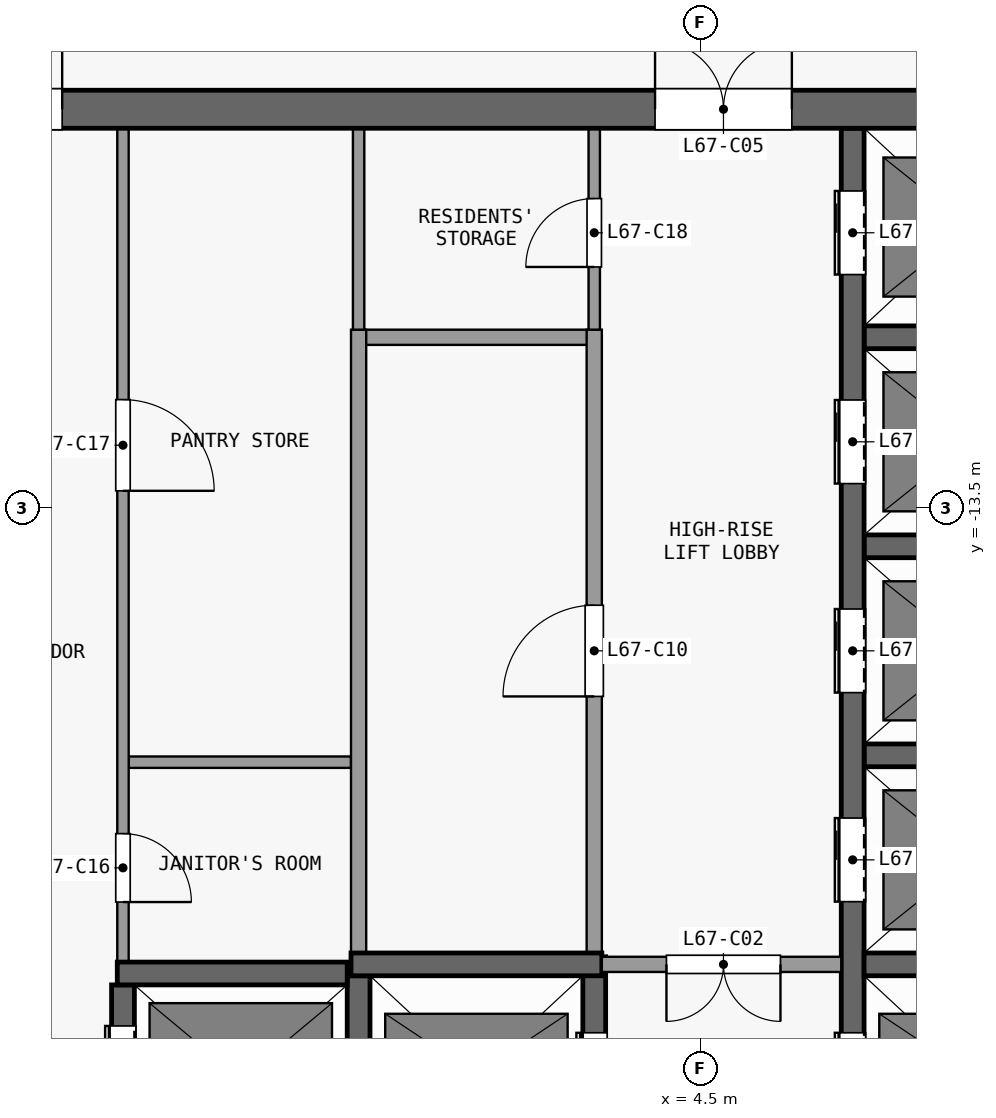
"""IFC4 building model, lengths in metres.
Left out: names, types, materials, properties, quantities, classifications, styles, units other than length and angle.
Written with IfcOpenShell. Run it as: python <this file> out.ifc"""

import sys

from ifc_helpers import new_model, si_unit, direction, frame, frame_2d, origin, place, context, subcontext, project, spatial, rectangle, extrude, element, fill, save


model = new_model("IFC4")
c1 = context("Model", 3, precision=1e-05, world=origin(), true_north=direction((0.0, 1.0)))
c2 = subcontext(c1, "Body", "Model", "MODEL_VIEW")
j1 = project(units=[si_unit("LENGTHUNIT", "METRE"), si_unit("PLANEANGLEUNIT", "RADIAN")], contexts=[c1])
p1 = place(None, origin())
s1 = spatial("IfcSite", under=j1, at=p1, CompositionType="ELEMENT")
p2 = place(p1, origin())
s2 = spatial("IfcBuilding", under=s1, at=p2, CompositionType="ELEMENT")
p3 = place(p2, frame((0.0, 0.0, 266.3)))
s3 = spatial("IfcBuildingStorey", under=s2, at=p3, CompositionType="ELEMENT", Elevation=266.3)
p4 = place(p3, frame((-13.1, -8.25, 0.0), z_axis=(0.0, 0.0, 1.0), x_axis=(1.0, 0.0, 0.0)))
e1 = element("IfcWall", 1, at=p4, inside=s3, PredefinedType="SHEAR", context=c2, shape_type="SweptSolid", body=[
    extrude(rectangle(XDim=26.2, YDim=0.5, at=frame_2d((13.1, 0.0))), origin(), (0.0, 0.0, 1.0), 3.3),
])
p5 = place(p4, frame((7.4, 0.0, 0.0)))
e2 = element("IfcOpeningElement", 2, at=p5, cuts=e1, PredefinedType="OPENING", context=c2, shape_type="SweptSolid", body=[
    extrude(rectangle(XDim=1.8, YDim=2.1, at=frame_2d((0.9, 1.05))), frame((0.0, 0.26, 0.0), z_axis=(0.0, -1.0, 0.0), x_axis=(1.0, 0.0, 0.0)), (0.0, 0.0, 1.0), 0.52),
])
p6 = place(p4, frame((17.0, 0.0, 0.0)))
e3 = element("IfcOpeningElement", 3, at=p6, cuts=e1, PredefinedType="OPENING", context=c2, shape_type="SweptSolid", body=[
    extrude(rectangle(XDim=1.8, YDim=2.1, at=frame_2d((0.9, 1.05))), frame((0.0, 0.26, 0.0), z_axis=(0.0, -1.0, 0.0), x_axis=(1.0, 0.0, 0.0)), (0.0, 0.0, 1.0), 0.52),
])
p7 = place(p4, frame((2.325, 0.0, 0.0)))
e4 = element("IfcOpeningElement", 4, at=p7, cuts=e1, PredefinedType="OPENING", context=c2, shape_type="SweptSolid", body=[
    extrude(rectangle(XDim=0.9, YDim=2.1, at=frame_2d((0.45, 1.05))), frame((0.0, 0.26, 0.0), z_axis=(0.0, -1.0, 0.0), x_axis=(1.0, 0.0, 0.0)), (0.0, 0.0, 1.0), 0.52),
])
p8 = place(p4, frame((22.975, 0.0, 0.0)))
e5 = element("IfcOpeningElement", 5, at=p8, cuts=e1, PredefinedType="OPENING", context=c2, shape_type="SweptSolid", body=[
    extrude(rectangle(XDim=0.9, YDim=2.1, at=frame_2d((0.45, 1.05))), frame((0.0, 0.26, 0.0), z_axis=(0.0, -1.0, 0.0), x_axis=(1.0, 0.0, 0.0)), (0.0, 0.0, 1.0), 0.52),
])
p9 = place(p3, frame((-3.175, -19.62, 0.0), z_axis=(0.0, 0.0, 1.0), x_axis=(1.0, 0.0, 0.0)))
e6 = element("IfcWall", 6, at=p9, inside=s3, PredefinedType="SHEAR", context=c2, shape_type="SweptSolid", body=[
    extrude(rectangle(XDim=3.025, YDim=0.3, at=frame_2d((1.513, 0.0))), origin(), (0.0, 0.0, 1.0), 3.3),
])
p10 = place(p3, frame((-0.1, -19.5, 0.0), z_axis=(0.0, 0.0, 1.0), x_axis=(1.0, 0.0, 0.0)))
e7 = element("IfcWall", 7, at=p10, inside=s3, PredefinedType="SHEAR", context=c2, shape_type="SweptSolid", body=[
    extrude(rectangle(XDim=3.3, YDim=0.3, at=frame_2d((1.65, 0.0))), origin(), (0.0, 0.0, 1.0), 3.3),
])
p11 = place(p3, frame((6.35, -19.5, 0.0), z_axis=(0.0, 0.0, 1.0), x_axis=(-1.0, 0.0, 0.0)))
e8 = element("IfcWall", 8, at=p11, inside=s3, PredefinedType="PARTITIONING", context=c2, shape_type="SweptSolid", body=[
    extrude(rectangle(XDim=3.15, YDim=0.2, at=frame_2d((1.575, 0.0))), origin(), (0.0, 0.0, 1.0), 3.3),
])
p12 = place(p11, frame((0.8, 0.0, 0.0)))
e9 = element("IfcOpeningElement", 9, at=p12, cuts=e8, PredefinedType="OPENING", context=c2, shape_type="SweptSolid", body=[
    extrude(rectangle(XDim=1.5, YDim=2.1, at=frame_2d((0.75, 1.05))), frame((0.0, 0.11, 0.0), z_axis=(0.0, -1.0, 0.0), x_axis=(1.0, 0.0, 0.0)), (0.0, 0.0, 1.0), 0.22),
])
p13 = place(p3, frame((6.65, -19.5, 0.0), z_axis=(0.0, 0.0, 1.0), x_axis=(1.0, 0.0, 0.0)))
e10 = element("IfcWall", 10, at=p13, inside=s3, PredefinedType="SHEAR", context=c2, shape_type="SweptSolid", body=[
    extrude(rectangle(XDim=2.8, YDim=0.3, at=frame_2d((1.4, 0.0))), origin(), (0.0, 0.0, 1.0), 3.3),
])
p14 = place(p3, frame((-3.025, -16.84, 0.0), z_axis=(0.0, 0.0, 1.0), x_axis=(1.0, 0.0, 0.0)))
e11 = element("IfcWall", 11, at=p14, inside=s3, PredefinedType="PARTITIONING", context=c2, shape_type="SweptSolid", body=[
    extrude(rectangle(XDim=2.925, YDim=0.15, at=frame_2d((1.462, 0.0))), origin(), (0.0, 0.0, 1.0), 3.3),
])
for number, where, z_axis, x_axis in (
    (12, (6.65, -16.75, 0.0), (0.0, 0.0, 1.0), (1.0, 0.0, 0.0)),
    (13, (6.65, -14.0, 0.0), (0.0, 0.0, 1.0), (1.0, 0.0, 0.0)),
):
    element("IfcWall", number, at=place(p3, frame(where, z_axis=z_axis, x_axis=x_axis)), inside=s3, PredefinedType="SHEAR", context=c2, shape_type="SweptSolid", body=[
        extrude(rectangle(XDim=2.8, YDim=0.3, at=frame_2d((1.4, 0.0))), origin(), (0.0, 0.0, 1.0), 3.3),
    ])
p15 = place(p3, frame((-0.075, -11.25, 0.0), z_axis=(0.0, 0.0, 1.0), x_axis=(1.0, 0.0, 0.0)))
e14 = element("IfcWall", 14, at=p15, inside=s3, PredefinedType="PARTITIONING", context=c2, shape_type="SweptSolid", body=[
    extrude(rectangle(XDim=3.25, YDim=0.2, at=frame_2d((1.625, 0.0))), origin(), (0.0, 0.0, 1.0), 3.3),
])
p16 = place(p3, frame((6.65, -11.25, 0.0), z_axis=(0.0, 0.0, 1.0), x_axis=(1.0, 0.0, 0.0)))
e15 = element("IfcWall", 15, at=p16, inside=s3, PredefinedType="SHEAR", context=c2, shape_type="SweptSolid", body=[
    extrude(rectangle(XDim=2.8, YDim=0.3, at=frame_2d((1.4, 0.0))), origin(), (0.0, 0.0, 1.0), 3.3),
])
p17 = place(p3, frame((-3.1, -22.25, 0.0), z_axis=(0.0, 0.0, 1.0), x_axis=(0.0, 1.0, 0.0)))
e16 = element("IfcWall", 16, at=p17, inside=s3, PredefinedType="SHEAR", context=c2, shape_type="SweptSolid", body=[
    extrude(rectangle(XDim=2.48, YDim=0.3, at=frame_2d((1.24, 0.0))), origin(), (0.0, 0.0, 1.0), 3.3),
])
p18 = place(p17, frame((0.54, 0.0, 0.0)))
e17 = element("IfcOpeningElement", 17, at=p18, cuts=e16, PredefinedType="OPENING", context=c2, shape_type="SweptSolid", body=[
    extrude(rectangle(XDim=1.4, YDim=2.1, at=frame_2d((0.7, 1.05))), frame((0.0, 0.16, 0.0), z_axis=(0.0, -1.0, 0.0), x_axis=(1.0, 0.0, 0.0)), (0.0, 0.0, 1.0), 0.32),
])
p19 = place(p3, frame((-3.1, -8.5, 0.0), z_axis=(0.0, 0.0, 1.0), x_axis=(0.0, -1.0, 0.0)))
e18 = element("IfcWall", 18, at=p19, inside=s3, PredefinedType="PARTITIONING", context=c2, shape_type="SweptSolid", body=[
    extrude(rectangle(XDim=10.97, YDim=0.15, at=frame_2d((5.485, 0.0))), origin(), (0.0, 0.0, 1.0), 3.3),
])
p20 = place(p19, frame((9.28, 0.0, 0.0)))
e19 = element("IfcOpeningElement", 19, at=p20, cuts=e18, PredefinedType="OPENING", context=c2, shape_type="SweptSolid", body=[
    extrude(rectangle(XDim=0.9, YDim=2.1, at=frame_2d((0.45, 1.05))), frame((0.0, 0.085, 0.0), z_axis=(0.0, -1.0, 0.0), x_axis=(1.0, 0.0, 0.0)), (0.0, 0.0, 1.0), 0.17),
])
p21 = place(p19, frame((3.57, 0.0, 0.0)))
e20 = element("IfcOpeningElement", 20, at=p21, cuts=e18, PredefinedType="OPENING", context=c2, shape_type="SweptSolid", body=[
    extrude(rectangle(XDim=1.2, YDim=2.1, at=frame_2d((0.6, 1.05))), frame((0.0, 0.085, 0.0), z_axis=(0.0, -1.0, 0.0), x_axis=(1.0, 0.0, 0.0)), (0.0, 0.0, 1.0), 0.17),
])
p22 = place(p3, frame((0.0, -22.25, 0.0), z_axis=(0.0, 0.0, 1.0), x_axis=(0.0, 1.0, 0.0)))
e21 = element("IfcWall", 21, at=p22, inside=s3, PredefinedType="SHEAR", context=c2, shape_type="SweptSolid", body=[
    extrude(rectangle(XDim=2.6, YDim=0.3, at=frame_2d((1.3, 0.0))), origin(), (0.0, 0.0, 1.0), 3.3),
])
p23 = place(p3, frame((0.0, -19.35, 0.0), z_axis=(0.0, 0.0, 1.0), x_axis=(0.0, 1.0, 0.0)))
e22 = element("IfcWall", 22, at=p23, inside=s3, PredefinedType="PARTITIONING", context=c2, shape_type="SweptSolid", body=[
    extrude(rectangle(XDim=8.2, YDim=0.2, at=frame_2d((4.1, 0.0))), origin(), (0.0, 0.0, 1.0), 3.3),
])
p24 = place(p3, frame((0.0, -11.15, 0.0), z_axis=(0.0, 0.0, 1.0), x_axis=(0.0, 1.0, 0.0)))
e23 = element("IfcWall", 23, at=p24, inside=s3, PredefinedType="PARTITIONING", context=c2, shape_type="SweptSolid", body=[
    extrude(rectangle(XDim=2.65, YDim=0.15, at=frame_2d((1.325, 0.0))), origin(), (0.0, 0.0, 1.0), 3.3),
])
p25 = place(p3, frame((3.1, -22.25, 0.0), z_axis=(0.0, 0.0, 1.0), x_axis=(0.0, 1.0, 0.0)))
e24 = element("IfcWall", 24, at=p25, inside=s3, PredefinedType="SHEAR", context=c2, shape_type="SweptSolid", body=[
    extrude(rectangle(XDim=2.85, YDim=0.3, at=frame_2d((1.425, 0.0))), origin(), (0.0, 0.0, 1.0), 3.3),
])
p26 = place(p25, frame((0.75, 0.0, 0.0)))
e25 = element("IfcOpeningElement", 25, at=p26, cuts=e24, PredefinedType="OPENING", context=c2, shape_type="SweptSolid", body=[
    extrude(rectangle(XDim=1.1, YDim=2.1, at=frame_2d((0.55, 1.05))), frame((0.0, 0.16, 0.0), z_axis=(0.0, -1.0, 0.0), x_axis=(1.0, 0.0, 0.0)), (0.0, 0.0, 1.0), 0.32),
])
p27 = place(p3, frame((3.1, -19.6, 0.0), z_axis=(0.0, 0.0, 1.0), x_axis=(0.0, 1.0, 0.0)))
e26 = element("IfcWall", 26, at=p27, inside=s3, PredefinedType="PARTITIONING", context=c2, shape_type="SweptSolid", body=[
    extrude(rectangle(XDim=8.45, YDim=0.2, at=frame_2d((4.225, 0.0))), origin(), (0.0, 0.0, 1.0), 3.3),
])
p28 = place(p27, frame((3.625, 0.0, 0.0)))
e27 = element("IfcOpeningElement", 27, at=p28, cuts=e26, PredefinedType="OPENING", context=c2, shape_type="SweptSolid", body=[
    extrude(rectangle(XDim=1.2, YDim=2.1, at=frame_2d((0.6, 1.05))), frame((0.0, 0.11, 0.0), z_axis=(0.0, -1.0, 0.0), x_axis=(1.0, 0.0, 0.0)), (0.0, 0.0, 1.0), 0.22),
])
p29 = place(p3, frame((3.1, -11.15, 0.0), z_axis=(0.0, 0.0, 1.0), x_axis=(0.0, 1.0, 0.0)))
e28 = element("IfcWall", 28, at=p29, inside=s3, PredefinedType="PARTITIONING", context=c2, shape_type="SweptSolid", body=[
    extrude(rectangle(XDim=2.65, YDim=0.15, at=frame_2d((1.325, 0.0))), origin(), (0.0, 0.0, 1.0), 3.3),
])
p30 = place(p29, frame((0.825, 0.0, 0.0)))
e29 = element("IfcOpeningElement", 29, at=p30, cuts=e28, PredefinedType="OPENING", context=c2, shape_type="SweptSolid", body=[
    extrude(rectangle(XDim=0.9, YDim=2.1, at=frame_2d((0.45, 1.05))), frame((0.0, 0.085, 0.0), z_axis=(0.0, -1.0, 0.0), x_axis=(1.0, 0.0, 0.0)), (0.0, 0.0, 1.0), 0.17),
])
p31 = place(p3, frame((6.5, -22.55, 0.0), z_axis=(0.0, 0.0, 1.0), x_axis=(0.0, 1.0, 0.0)))
e30 = element("IfcWall", 30, at=p31, inside=s3, PredefinedType="SHEAR", context=c2, shape_type="SweptSolid", body=[
    extrude(rectangle(XDim=14.05, YDim=0.3, at=frame_2d((7.025, 0.0))), origin(), (0.0, 0.0, 1.0), 3.3),
])
p32 = place(p31, frame((1.05, 0.0, 0.0)))
e31 = element("IfcOpeningElement", 31, at=p32, cuts=e30, PredefinedType="OPENING", context=c2, shape_type="SweptSolid", body=[
    extrude(rectangle(XDim=1.1, YDim=2.1, at=frame_2d((0.55, 1.05))), frame((0.0, 0.16, 0.0), z_axis=(0.0, -1.0, 0.0), x_axis=(1.0, 0.0, 0.0)), (0.0, 0.0, 1.0), 0.32),
])
p33 = place(p31, frame((3.875, 0.0, 0.0)))
e32 = element("IfcOpeningElement", 32, at=p33, cuts=e30, PredefinedType="OPENING", context=c2, shape_type="SweptSolid", body=[
    extrude(rectangle(XDim=1.1, YDim=2.1, at=frame_2d((0.55, 1.05))), frame((0.0, 0.16, 0.0), z_axis=(0.0, -1.0, 0.0), x_axis=(1.0, 0.0, 0.0)), (0.0, 0.0, 1.0), 0.32),
])
p34 = place(p31, frame((6.625, 0.0, 0.0)))
e33 = element("IfcOpeningElement", 33, at=p34, cuts=e30, PredefinedType="OPENING", context=c2, shape_type="SweptSolid", body=[
    extrude(rectangle(XDim=1.1, YDim=2.1, at=frame_2d((0.55, 1.05))), frame((0.0, 0.16, 0.0), z_axis=(0.0, -1.0, 0.0), x_axis=(1.0, 0.0, 0.0)), (0.0, 0.0, 1.0), 0.32),
])
p35 = place(p31, frame((9.375, 0.0, 0.0)))
e34 = element("IfcOpeningElement", 34, at=p35, cuts=e30, PredefinedType="OPENING", context=c2, shape_type="SweptSolid", body=[
    extrude(rectangle(XDim=1.1, YDim=2.1, at=frame_2d((0.55, 1.05))), frame((0.0, 0.16, 0.0), z_axis=(0.0, -1.0, 0.0), x_axis=(1.0, 0.0, 0.0)), (0.0, 0.0, 1.0), 0.32),
])
p36 = place(p31, frame((12.125, 0.0, 0.0)))
e35 = element("IfcOpeningElement", 35, at=p36, cuts=e30, PredefinedType="OPENING", context=c2, shape_type="SweptSolid", body=[
    extrude(rectangle(XDim=1.1, YDim=2.1, at=frame_2d((0.55, 1.05))), frame((0.0, 0.16, 0.0), z_axis=(0.0, -1.0, 0.0), x_axis=(1.0, 0.0, 0.0)), (0.0, 0.0, 1.0), 0.32),
])
p37 = place(p26, origin())
e36 = element("IfcDoor", 36, at=p37, inside=s3, OperationType="DOUBLE_DOOR_SLIDING", PredefinedType="DOOR", context=c2, shape_type="SweptSolid", body=[
    extrude(rectangle(XDim=1.1, YDim=2.1, at=frame_2d((0.55, 1.05))), frame((0.0, 0.025, 0.0), z_axis=(0.0, -1.0, 0.0), x_axis=(1.0, 0.0, 0.0)), (0.0, 0.0, 1.0), 0.05),
])
fill(e25, e36)
p38 = place(p32, origin())
e37 = element("IfcDoor", 37, at=p38, inside=s3, OperationType="DOUBLE_DOOR_SLIDING", PredefinedType="DOOR", context=c2, shape_type="SweptSolid", body=[
    extrude(rectangle(XDim=1.1, YDim=2.1, at=frame_2d((0.55, 1.05))), frame((0.0, 0.025, 0.0), z_axis=(0.0, -1.0, 0.0), x_axis=(1.0, 0.0, 0.0)), (0.0, 0.0, 1.0), 0.05),
])
fill(e31, e37)
p39 = place(p33, origin())
e38 = element("IfcDoor", 38, at=p39, inside=s3, OperationType="DOUBLE_DOOR_SLIDING", PredefinedType="DOOR", context=c2, shape_type="SweptSolid", body=[
    extrude(rectangle(XDim=1.1, YDim=2.1, at=frame_2d((0.55, 1.05))), frame((0.0, 0.025, 0.0), z_axis=(0.0, -1.0, 0.0), x_axis=(1.0, 0.0, 0.0)), (0.0, 0.0, 1.0), 0.05),
])
fill(e32, e38)
p40 = place(p34, origin())
e39 = element("IfcDoor", 39, at=p40, inside=s3, OperationType="DOUBLE_DOOR_SLIDING", PredefinedType="DOOR", context=c2, shape_type="SweptSolid", body=[
    extrude(rectangle(XDim=1.1, YDim=2.1, at=frame_2d((0.55, 1.05))), frame((0.0, 0.025, 0.0), z_axis=(0.0, -1.0, 0.0), x_axis=(1.0, 0.0, 0.0)), (0.0, 0.0, 1.0), 0.05),
])
fill(e33, e39)
p41 = place(p35, origin())
e40 = element("IfcDoor", 40, at=p41, inside=s3, OperationType="DOUBLE_DOOR_SLIDING", PredefinedType="DOOR", context=c2, shape_type="SweptSolid", body=[
    extrude(rectangle(XDim=1.1, YDim=2.1, at=frame_2d((0.55, 1.05))), frame((0.0, 0.025, 0.0), z_axis=(0.0, -1.0, 0.0), x_axis=(1.0, 0.0, 0.0)), (0.0, 0.0, 1.0), 0.05),
])
fill(e34, e40)
p42 = place(p36, origin())
e41 = element("IfcDoor", 41, at=p42, inside=s3, OperationType="DOUBLE_DOOR_SLIDING", PredefinedType="DOOR", context=c2, shape_type="SweptSolid", body=[
    extrude(rectangle(XDim=1.1, YDim=2.1, at=frame_2d((0.55, 1.05))), frame((0.0, 0.025, 0.0), z_axis=(0.0, -1.0, 0.0), x_axis=(1.0, 0.0, 0.0)), (0.0, 0.0, 1.0), 0.05),
])
fill(e35, e41)
p43 = place(p18, origin())
e42 = element("IfcDoor", 42, at=p43, inside=s3, OperationType="DOUBLE_DOOR_SLIDING", PredefinedType="DOOR", context=c2, shape_type="SweptSolid", body=[
    extrude(rectangle(XDim=1.4, YDim=2.1, at=frame_2d((0.7, 1.05))), frame((0.0, 0.025, 0.0), z_axis=(0.0, -1.0, 0.0), x_axis=(1.0, 0.0, 0.0)), (0.0, 0.0, 1.0), 0.05),
])
fill(e17, e42)
p44 = place(p12, origin())
e43 = element("IfcDoor", 43, at=p44, inside=s3, OperationType="DOUBLE_DOOR_SINGLE_SWING", PredefinedType="DOOR", context=c2, shape_type="SweptSolid", body=[
    extrude(rectangle(XDim=1.5, YDim=2.1, at=frame_2d((0.75, 1.05))), frame((0.0, 0.025, 0.0), z_axis=(0.0, -1.0, 0.0), x_axis=(1.0, 0.0, 0.0)), (0.0, 0.0, 1.0), 0.05),
])
fill(e9, e43)
p45 = place(p5, origin())
e44 = element("IfcDoor", 44, at=p45, inside=s3, OperationType="DOUBLE_DOOR_SINGLE_SWING", PredefinedType="DOOR", context=c2, shape_type="SweptSolid", body=[
    extrude(rectangle(XDim=1.8, YDim=2.1, at=frame_2d((0.9, 1.05))), frame((0.0, 0.025, 0.0), z_axis=(0.0, -1.0, 0.0), x_axis=(1.0, 0.0, 0.0)), (0.0, 0.0, 1.0), 0.05),
])
fill(e2, e44)
p46 = place(p6, origin())
e45 = element("IfcDoor", 45, at=p46, inside=s3, OperationType="DOUBLE_DOOR_SINGLE_SWING", PredefinedType="DOOR", context=c2, shape_type="SweptSolid", body=[
    extrude(rectangle(XDim=1.8, YDim=2.1, at=frame_2d((0.9, 1.05))), frame((0.0, 0.025, 0.0), z_axis=(0.0, -1.0, 0.0), x_axis=(1.0, 0.0, 0.0)), (0.0, 0.0, 1.0), 0.05),
])
fill(e3, e45)
p47 = place(p28, origin())
e46 = element("IfcDoor", 46, at=p47, inside=s3, OperationType="SINGLE_SWING_LEFT", PredefinedType="DOOR", context=c2, shape_type="SweptSolid", body=[
    extrude(rectangle(XDim=1.2, YDim=2.1, at=frame_2d((0.6, 1.05))), frame((0.0, 0.025, 0.0), z_axis=(0.0, -1.0, 0.0), x_axis=(1.0, 0.0, 0.0)), (0.0, 0.0, 1.0), 0.05),
])
fill(e27, e46)
p48 = place(p20, origin())
e47 = element("IfcDoor", 47, at=p48, inside=s3, OperationType="SINGLE_SWING_RIGHT", PredefinedType="DOOR", context=c2, shape_type="SweptSolid", body=[
    extrude(rectangle(XDim=0.9, YDim=2.1, at=frame_2d((0.45, 1.05))), frame((0.0, 0.025, 0.0), z_axis=(0.0, -1.0, 0.0), x_axis=(1.0, 0.0, 0.0)), (0.0, 0.0, 1.0), 0.05),
])
fill(e19, e47)
p49 = place(p21, origin())
e48 = element("IfcDoor", 48, at=p49, inside=s3, OperationType="SINGLE_SWING_RIGHT", PredefinedType="DOOR", context=c2, shape_type="SweptSolid", body=[
    extrude(rectangle(XDim=1.2, YDim=2.1, at=frame_2d((0.6, 1.05))), frame((0.0, 0.025, 0.0), z_axis=(0.0, -1.0, 0.0), x_axis=(1.0, 0.0, 0.0)), (0.0, 0.0, 1.0), 0.05),
])
fill(e20, e48)
p50 = place(p30, origin())
e49 = element("IfcDoor", 49, at=p50, inside=s3, OperationType="SINGLE_SWING_LEFT", PredefinedType="DOOR", context=c2, shape_type="SweptSolid", body=[
    extrude(rectangle(XDim=0.9, YDim=2.1, at=frame_2d((0.45, 1.05))), frame((0.0, 0.025, 0.0), z_axis=(0.0, -1.0, 0.0), x_axis=(1.0, 0.0, 0.0)), (0.0, 0.0, 1.0), 0.05),
])
fill(e29, e49)
save(model, sys.argv[1])
